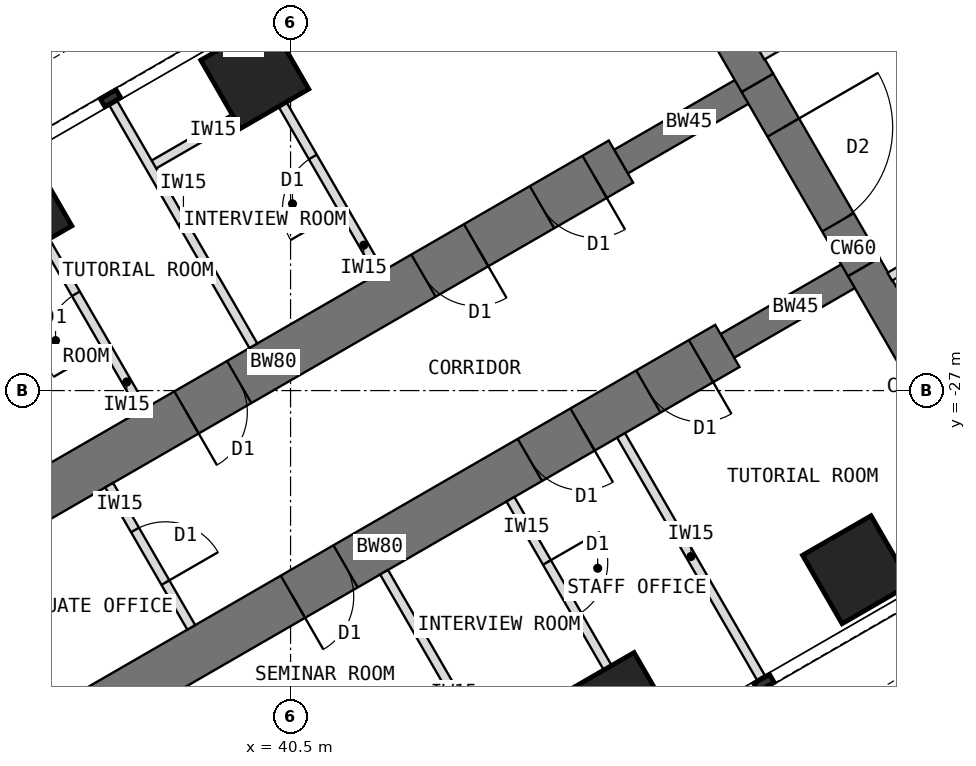
"""IFC4 building model, lengths in metres.
Left out: names, types, materials, properties, quantities, classifications, styles, units other than length and angle.
Written with IfcOpenShell. Run it as: python <this file> out.ifc"""

import sys

from ifc_helpers import new_model, si_unit, direction, frame, frame_2d, origin, origin_2d, place, context, subcontext, project, spatial, rectangle, extrude, element, fill, save


model = new_model("IFC4")
c1 = context("Model", 3, precision=1e-05, world=origin(), true_north=direction((0.0, 1.0)))
c2 = subcontext(c1, "Body", "Model", "MODEL_VIEW")
j1 = project(units=[si_unit("LENGTHUNIT", "METRE"), si_unit("PLANEANGLEUNIT", "RADIAN")], contexts=[c1])
p1 = place(None, origin())
s1 = spatial("IfcSite", under=j1, at=p1, CompositionType="ELEMENT")
p2 = place(p1, origin())
s2 = spatial("IfcBuilding", under=s1, at=p2, CompositionType="ELEMENT")
p3 = place(p2, frame((0.0, 0.0, 133.5)))
s3 = spatial("IfcBuildingStorey", under=s2, at=p3, CompositionType="ELEMENT", Elevation=133.5)
p4 = place(p3, frame((45.904, -18.0, 0.0), z_axis=(0.0, 0.0, 1.0), x_axis=(0.500024481964, -0.866011268655, 0.0)))
e1 = element("IfcWall", 1, at=p4, inside=s3, PredefinedType="SHEAR", context=c2, shape_type="SweptSolid", body=[
    extrude(rectangle(XDim=4.548, YDim=0.6, at=frame_2d((2.274, 0.0))), origin(), (0.0, 0.0, 1.0), 4.0),
])
p5 = place(p3, frame((48.178, -21.939, 0.0), z_axis=(0.0, 0.0, 1.0), x_axis=(0.500010275428, -0.866019471182, 0.0)))
e2 = element("IfcWall", 2, at=p5, inside=s3, PredefinedType="SHEAR", context=c2, shape_type="SweptSolid", body=[
    extrude(rectangle(XDim=3.5, YDim=0.6, at=frame_2d((1.75, 0.0))), origin(), (0.0, 0.0, 1.0), 4.0),
])
p6 = place(p5, frame((0.85, 0.0, 0.0)))
e3 = element("IfcOpeningElement", 3, at=p6, cuts=e2, PredefinedType="OPENING", context=c2, shape_type="SweptSolid", body=[
    extrude(rectangle(XDim=1.8, YDim=2.1, at=frame_2d((0.9, 1.05))), frame((0.0, 0.31, 0.0), z_axis=(0.0, -1.0, 0.0), x_axis=(1.0, 0.0, 0.0)), (0.0, 0.0, 1.0), 0.62),
])
p7 = place(p3, frame((49.928, -24.97, 0.0), z_axis=(0.0, 0.0, 1.0), x_axis=(0.499984222037, -0.866034513004, 0.0)))
e4 = element("IfcWall", 4, at=p7, inside=s3, PredefinedType="SHEAR", context=c2, shape_type="SweptSolid", body=[
    extrude(rectangle(XDim=4.548, YDim=0.6, at=frame_2d((2.274, 0.0))), origin(), (0.0, 0.0, 1.0), 4.0),
])
p8 = place(p3, frame((49.928, -24.97, 0.0), z_axis=(0.0, 0.0, 1.0), x_axis=(-0.866031863473, -0.499988811324, 0.0)))
e5 = element("IfcWall", 5, at=p8, inside=s3, PredefinedType="SHEAR", context=c2, shape_type="SweptSolid", body=[
    extrude(rectangle(XDim=2.592, YDim=0.45, at=frame_2d((1.296, 0.0))), origin(), (0.0, 0.0, 1.0), 4.0),
])
p9 = place(p3, frame((47.684, -26.266, 0.0), z_axis=(0.0, 0.0, 1.0), x_axis=(-0.866027579429, -0.499996231654, 0.0)))
e6 = element("IfcWall", 6, at=p9, inside=s3, PredefinedType="SHEAR", context=c2, shape_type="SweptSolid", body=[
    extrude(rectangle(XDim=13.2, YDim=0.8, at=frame_2d((6.6, 0.0))), origin(), (0.0, 0.0, 1.0), 4.0),
])
p10 = place(p9, frame((0.5, 0.0, 0.0)))
e7 = element("IfcOpeningElement", 7, at=p10, cuts=e6, PredefinedType="OPENING", context=c2, shape_type="SweptSolid", body=[
    extrude(rectangle(XDim=1.0, YDim=2.1, at=frame_2d((0.5, 1.05))), frame((0.0, 0.41, 0.0), z_axis=(0.0, -1.0, 0.0), x_axis=(1.0, 0.0, 0.0)), (0.0, 0.0, 1.0), 0.82),
])
p11 = place(p9, frame((2.75, 0.0, 0.0)))
e8 = element("IfcOpeningElement", 8, at=p11, cuts=e6, PredefinedType="OPENING", context=c2, shape_type="SweptSolid", body=[
    extrude(rectangle(XDim=1.0, YDim=2.1, at=frame_2d((0.5, 1.05))), frame((0.0, 0.41, 0.0), z_axis=(0.0, -1.0, 0.0), x_axis=(1.0, 0.0, 0.0)), (0.0, 0.0, 1.0), 0.82),
])
p12 = place(p9, frame((7.25, 0.0, 0.0)))
e9 = element("IfcOpeningElement", 9, at=p12, cuts=e6, PredefinedType="OPENING", context=c2, shape_type="SweptSolid", body=[
    extrude(rectangle(XDim=1.0, YDim=2.1, at=frame_2d((0.5, 1.05))), frame((0.0, 0.41, 0.0), z_axis=(0.0, -1.0, 0.0), x_axis=(1.0, 0.0, 0.0)), (0.0, 0.0, 1.0), 0.82),
])
p13 = place(p3, frame((48.178, -21.939, 0.0), z_axis=(0.0, 0.0, 1.0), x_axis=(-0.866072649678, -0.499918158782, 0.0)))
e10 = element("IfcWall", 10, at=p13, inside=s3, PredefinedType="SHEAR", context=c2, shape_type="SweptSolid", body=[
    extrude(rectangle(XDim=2.592, YDim=0.45, at=frame_2d((1.296, 0.0))), origin(), (0.0, 0.0, 1.0), 4.0),
])
p14 = place(p3, frame((45.934, -23.234, 0.0), z_axis=(0.0, 0.0, 1.0), x_axis=(-0.866019570528, -0.500010103361, 0.0)))
e11 = element("IfcWall", 11, at=p14, inside=s3, PredefinedType="SHEAR", context=c2, shape_type="SweptSolid", body=[
    extrude(rectangle(XDim=13.2, YDim=0.8, at=frame_2d((6.6, 0.0))), origin(), (0.0, 0.0, 1.0), 4.0),
])
p15 = place(p14, frame((0.5, 0.0, 0.0)))
e12 = element("IfcOpeningElement", 12, at=p15, cuts=e11, PredefinedType="OPENING", context=c2, shape_type="SweptSolid", body=[
    extrude(rectangle(XDim=1.0, YDim=2.1, at=frame_2d((0.5, 1.05))), frame((0.0, 0.41, 0.0), z_axis=(0.0, -1.0, 0.0), x_axis=(1.0, 0.0, 0.0)), (0.0, 0.0, 1.0), 0.82),
])
p16 = place(p14, frame((2.75, 0.0, 0.0)))
e13 = element("IfcOpeningElement", 13, at=p16, cuts=e11, PredefinedType="OPENING", context=c2, shape_type="SweptSolid", body=[
    extrude(rectangle(XDim=1.0, YDim=2.1, at=frame_2d((0.5, 1.05))), frame((0.0, 0.41, 0.0), z_axis=(0.0, -1.0, 0.0), x_axis=(1.0, 0.0, 0.0)), (0.0, 0.0, 1.0), 0.82),
])
p17 = place(p14, frame((7.25, 0.0, 0.0)))
e14 = element("IfcOpeningElement", 14, at=p17, cuts=e11, PredefinedType="OPENING", context=c2, shape_type="SweptSolid", body=[
    extrude(rectangle(XDim=1.0, YDim=2.1, at=frame_2d((0.5, 1.05))), frame((0.0, 0.41, 0.0), z_axis=(0.0, -1.0, 0.0), x_axis=(1.0, 0.0, 0.0)), (0.0, 0.0, 1.0), 0.82),
])
for number, where, z_axis, x_axis in (
    (15, (49.809, -29.946, 0.0), (0.0, 0.0, 1.0), (0.866, 0.5, 0.0)),
    (16, (45.912, -32.196, 0.0), (0.0, 0.0, 1.0), (0.866, 0.5, 0.0)),
    (17, (39.912, -21.804, 0.0), (0.0, 0.0, 1.0), (0.866, 0.5, 0.0)),
    (18, (36.014, -24.054, 0.0), (0.0, 0.0, 1.0), (0.866, 0.5, 0.0)),
):
    element("IfcColumn", number, at=place(p3, frame(where, z_axis=z_axis, x_axis=x_axis)), inside=s3, PredefinedType="COLUMN", context=c2, shape_type="SweptSolid", body=[
        extrude(rectangle(XDim=1.3, YDim=1.3, at=origin_2d()), origin(), (0.0, 0.0, 1.0), 4.0),
    ])
for number, where, z_axis, x_axis in (
    (19, (45.935, -27.737, 0.0), (0.0, 0.0, 1.0), (0.5, -0.866, 0.0)),
    (20, (42.038, -29.987, 0.0), (0.0, 0.0, 1.0), (0.5, -0.866, 0.0)),
):
    element("IfcWall", number, at=place(p3, frame(where, z_axis=z_axis, x_axis=x_axis)), inside=s3, PredefinedType="PARTITIONING", context=c2, shape_type="SweptSolid", body=[
        extrude(rectangle(XDim=4.6, YDim=0.15, at=frame_2d((2.3, 0.0))), origin(), (0.0, 0.0, 1.0), 3.8),
    ])
p18 = place(p3, frame((45.816, -31.731, 0.0), z_axis=(0.0, 0.0, 1.0), x_axis=(-0.866024647952, -0.500001309137, 0.0)))
e21 = element("IfcWall", 21, at=p18, inside=s3, PredefinedType="PARTITIONING", context=c2, shape_type="SweptSolid", body=[
    extrude(rectangle(XDim=2.4, YDim=0.15, at=frame_2d((1.2, 0.0))), origin(), (0.0, 0.0, 1.0), 3.8),
])
p19 = place(p3, frame((44.116, -28.787, 0.0), z_axis=(0.0, 0.0, 1.0), x_axis=(0.499977295307, -0.866038511948, 0.0)))
e22 = element("IfcWall", 22, at=p19, inside=s3, PredefinedType="PARTITIONING", context=c2, shape_type="SweptSolid", body=[
    extrude(rectangle(XDim=3.4, YDim=0.15, at=frame_2d((1.7, 0.0))), origin(), (0.0, 0.0, 1.0), 3.8),
])
p20 = place(p19, frame((1.2, 0.0, 0.0)))
e23 = element("IfcOpeningElement", 23, at=p20, cuts=e22, PredefinedType="OPENING", context=c2, shape_type="SweptSolid", body=[
    extrude(rectangle(XDim=1.0, YDim=2.1, at=frame_2d((0.5, 1.05))), frame((0.0, 0.085, 0.0), z_axis=(0.0, -1.0, 0.0), x_axis=(1.0, 0.0, 0.0)), (0.0, 0.0, 1.0), 0.17),
])
p21 = place(p3, frame((39.888, -26.263, 0.0), z_axis=(0.0, 0.0, 1.0), x_axis=(-0.500014953309, 0.866016770315, 0.0)))
e24 = element("IfcWall", 24, at=p21, inside=s3, PredefinedType="PARTITIONING", context=c2, shape_type="SweptSolid", body=[
    extrude(rectangle(XDim=4.6, YDim=0.15, at=frame_2d((2.3, 0.0))), origin(), (0.0, 0.0, 1.0), 3.8),
])
p22 = place(p3, frame((40.266, -22.119, 0.0), z_axis=(0.0, 0.0, 1.0), x_axis=(-0.866024647952, -0.500001309137, 0.0)))
e25 = element("IfcWall", 25, at=p22, inside=s3, PredefinedType="PARTITIONING", context=c2, shape_type="SweptSolid", body=[
    extrude(rectangle(XDim=2.4, YDim=0.15, at=frame_2d((1.2, 0.0))), origin(), (0.0, 0.0, 1.0), 3.8),
])
p23 = place(p3, frame((41.967, -25.063, 0.0), z_axis=(0.0, 0.0, 1.0), x_axis=(-0.500062241894, 0.865989465428, 0.0)))
e26 = element("IfcWall", 26, at=p23, inside=s3, PredefinedType="PARTITIONING", context=c2, shape_type="SweptSolid", body=[
    extrude(rectangle(XDim=3.4, YDim=0.15, at=frame_2d((1.7, 0.0))), origin(), (0.0, 0.0, 1.0), 3.8),
])
p24 = place(p23, frame((1.2, 0.0, 0.0)))
e27 = element("IfcOpeningElement", 27, at=p24, cuts=e26, PredefinedType="OPENING", context=c2, shape_type="SweptSolid", body=[
    extrude(rectangle(XDim=1.0, YDim=2.1, at=frame_2d((0.5, 1.05))), frame((0.0, 0.085, 0.0), z_axis=(0.0, -1.0, 0.0), x_axis=(1.0, 0.0, 0.0)), (0.0, 0.0, 1.0), 0.17),
])
p25 = place(p3, frame((38.069, -27.313, 0.0), z_axis=(0.0, 0.0, 1.0), x_axis=(-0.500008388397, 0.866020560687, 0.0)))
e28 = element("IfcWall", 28, at=p25, inside=s3, PredefinedType="PARTITIONING", context=c2, shape_type="SweptSolid", body=[
    extrude(rectangle(XDim=3.4, YDim=0.15, at=frame_2d((1.7, 0.0))), origin(), (0.0, 0.0, 1.0), 3.8),
])
p26 = place(p25, frame((1.2, 0.0, 0.0)))
e29 = element("IfcOpeningElement", 29, at=p26, cuts=e28, PredefinedType="OPENING", context=c2, shape_type="SweptSolid", body=[
    extrude(rectangle(XDim=1.0, YDim=2.1, at=frame_2d((0.5, 1.05))), frame((0.0, 0.085, 0.0), z_axis=(0.0, -1.0, 0.0), x_axis=(1.0, 0.0, 0.0)), (0.0, 0.0, 1.0), 0.17),
])
p27 = place(p3, frame((48.254, -21.49, 0.0), z_axis=(0.0, 0.0, 1.0), x_axis=(0.866025707867, 0.499999473313, 0.0)))
e30 = element("IfcWall", 30, at=p27, inside=s3, PredefinedType="PARTITIONING", context=c2, shape_type="SweptSolid", body=[
    extrude(rectangle(XDim=4.476, YDim=0.15, at=frame_2d((2.238, 0.0))), origin(), (0.0, 0.0, 1.0), 3.8),
])
p28 = place(p27, frame((2.633, 0.0, 0.0)))
e31 = element("IfcOpeningElement", 31, at=p28, cuts=e30, PredefinedType="OPENING", context=c2, shape_type="SweptSolid", body=[
    extrude(rectangle(XDim=1.0, YDim=2.1, at=frame_2d((0.5, 1.05))), frame((0.0, 0.085, 0.0), z_axis=(0.0, -1.0, 0.0), x_axis=(1.0, 0.0, 0.0)), (0.0, 0.0, 1.0), 0.17),
])
p29 = place(p3, frame((54.23, -22.89, 0.0), z_axis=(0.0, 0.0, 1.0), x_axis=(-0.866025707867, -0.499999473313, 0.0)))
e32 = element("IfcWall", 32, at=p29, inside=s3, PredefinedType="PARTITIONING", context=c2, shape_type="SweptSolid", body=[
    extrude(rectangle(XDim=4.476, YDim=0.15, at=frame_2d((2.238, 0.0))), origin(), (0.0, 0.0, 1.0), 3.8),
])
p30 = place(p29, frame((0.843, 0.0, 0.0)))
e33 = element("IfcOpeningElement", 33, at=p30, cuts=e32, PredefinedType="OPENING", context=c2, shape_type="SweptSolid", body=[
    extrude(rectangle(XDim=1.0, YDim=2.1, at=frame_2d((0.5, 1.05))), frame((0.0, 0.085, 0.0), z_axis=(0.0, -1.0, 0.0), x_axis=(1.0, 0.0, 0.0)), (0.0, 0.0, 1.0), 0.17),
])
p31 = place(p3, frame((37.517, -28.556, 0.0), z_axis=(0.0, 0.0, 1.0), x_axis=(0.500048589285, -0.86599734893, 0.0)))
e34 = element("IfcWall", 34, at=p31, inside=s3, PredefinedType="PARTITIONING", context=c2, shape_type="SweptSolid", body=[
    extrude(rectangle(XDim=2.7, YDim=0.15, at=frame_2d((1.35, 0.0))), origin(), (0.0, 0.0, 1.0), 3.8),
])
p32 = place(p31, frame((0.85, 0.0, 0.0)))
e35 = element("IfcOpeningElement", 35, at=p32, cuts=e34, PredefinedType="OPENING", context=c2, shape_type="SweptSolid", body=[
    extrude(rectangle(XDim=1.0, YDim=2.1, at=frame_2d((0.5, 1.05))), frame((0.0, 0.085, 0.0), z_axis=(0.0, -1.0, 0.0), x_axis=(1.0, 0.0, 0.0)), (0.0, 0.0, 1.0), 0.17),
])
p33 = place(p6, origin())
e36 = element("IfcDoor", 36, at=p33, inside=s3, OperationType="DOUBLE_DOOR_DOUBLE_SWING", PredefinedType="DOOR", context=c2, shape_type="SweptSolid", body=[
    extrude(rectangle(XDim=1.72, YDim=2.06, at=frame_2d((0.9, 1.03))), frame((0.0, 0.025, 0.0), z_axis=(0.0, -1.0, 0.0), x_axis=(1.0, 0.0, 0.0)), (0.0, 0.0, 1.0), 0.05),
    extrude(rectangle(XDim=0.04, YDim=2.1, at=frame_2d((0.02, 1.05))), frame((0.0, 0.3, 0.0), z_axis=(0.0, -1.0, 0.0), x_axis=(1.0, 0.0, 0.0)), (0.0, 0.0, 1.0), 0.6),
    extrude(rectangle(XDim=0.04, YDim=2.1, at=frame_2d((1.78, 1.05))), frame((0.0, 0.3, 0.0), z_axis=(0.0, -1.0, 0.0), x_axis=(1.0, 0.0, 0.0)), (0.0, 0.0, 1.0), 0.6),
    extrude(rectangle(XDim=1.72, YDim=0.04, at=frame_2d((0.9, 2.08))), frame((0.0, 0.3, 0.0), z_axis=(0.0, -1.0, 0.0), x_axis=(1.0, 0.0, 0.0)), (0.0, 0.0, 1.0), 0.6),
])
fill(e3, e36)
p34 = place(p20, origin())
e37 = element("IfcDoor", 37, at=p34, inside=s3, OperationType="SINGLE_SWING_LEFT", PredefinedType="DOOR", context=c2, shape_type="SweptSolid", body=[
    extrude(rectangle(XDim=1.0, YDim=2.1, at=frame_2d((0.5, 1.05))), frame((0.0, 0.025, 0.0), z_axis=(0.0, -1.0, 0.0), x_axis=(1.0, 0.0, 0.0)), (0.0, 0.0, 1.0), 0.05),
])
fill(e23, e37)
p35 = place(p24, origin())
e38 = element("IfcDoor", 38, at=p35, inside=s3, OperationType="SINGLE_SWING_LEFT", PredefinedType="DOOR", context=c2, shape_type="SweptSolid", body=[
    extrude(rectangle(XDim=1.0, YDim=2.1, at=frame_2d((0.5, 1.05))), frame((0.0, 0.025, 0.0), z_axis=(0.0, -1.0, 0.0), x_axis=(1.0, 0.0, 0.0)), (0.0, 0.0, 1.0), 0.05),
])
fill(e27, e38)
p36 = place(p26, origin())
e39 = element("IfcDoor", 39, at=p36, inside=s3, OperationType="SINGLE_SWING_LEFT", PredefinedType="DOOR", context=c2, shape_type="SweptSolid", body=[
    extrude(rectangle(XDim=1.0, YDim=2.1, at=frame_2d((0.5, 1.05))), frame((0.0, 0.025, 0.0), z_axis=(0.0, -1.0, 0.0), x_axis=(1.0, 0.0, 0.0)), (0.0, 0.0, 1.0), 0.05),
])
fill(e29, e39)
p37 = place(p32, origin())
e40 = element("IfcDoor", 40, at=p37, inside=s3, OperationType="SINGLE_SWING_RIGHT", PredefinedType="DOOR", context=c2, shape_type="SweptSolid", body=[
    extrude(rectangle(XDim=1.0, YDim=2.1, at=frame_2d((0.5, 1.05))), frame((0.0, 0.025, 0.0), z_axis=(0.0, -1.0, 0.0), x_axis=(1.0, 0.0, 0.0)), (0.0, 0.0, 1.0), 0.05),
])
fill(e35, e40)
p38 = place(p10, origin())
e41 = element("IfcDoor", 41, at=p38, inside=s3, OperationType="SINGLE_SWING_LEFT", PredefinedType="DOOR", context=c2, shape_type="SweptSolid", body=[
    extrude(rectangle(XDim=0.92, YDim=2.06, at=frame_2d((0.5, 1.03))), frame((0.0, 0.025, 0.0), z_axis=(0.0, -1.0, 0.0), x_axis=(1.0, 0.0, 0.0)), (0.0, 0.0, 1.0), 0.05),
    extrude(rectangle(XDim=0.04, YDim=2.1, at=frame_2d((0.02, 1.05))), frame((0.0, 0.4, 0.0), z_axis=(0.0, -1.0, 0.0), x_axis=(1.0, 0.0, 0.0)), (0.0, 0.0, 1.0), 0.8),
    extrude(rectangle(XDim=0.04, YDim=2.1, at=frame_2d((0.98, 1.05))), frame((0.0, 0.4, 0.0), z_axis=(0.0, -1.0, 0.0), x_axis=(1.0, 0.0, 0.0)), (0.0, 0.0, 1.0), 0.8),
    extrude(rectangle(XDim=0.92, YDim=0.04, at=frame_2d((0.5, 2.08))), frame((0.0, 0.4, 0.0), z_axis=(0.0, -1.0, 0.0), x_axis=(1.0, 0.0, 0.0)), (0.0, 0.0, 1.0), 0.8),
])
fill(e7, e41)
p39 = place(p11, origin())
e42 = element("IfcDoor", 42, at=p39, inside=s3, OperationType="SINGLE_SWING_LEFT", PredefinedType="DOOR", context=c2, shape_type="SweptSolid", body=[
    extrude(rectangle(XDim=0.92, YDim=2.06, at=frame_2d((0.5, 1.03))), frame((0.0, 0.025, 0.0), z_axis=(0.0, -1.0, 0.0), x_axis=(1.0, 0.0, 0.0)), (0.0, 0.0, 1.0), 0.05),
    extrude(rectangle(XDim=0.04, YDim=2.1, at=frame_2d((0.02, 1.05))), frame((0.0, 0.4, 0.0), z_axis=(0.0, -1.0, 0.0), x_axis=(1.0, 0.0, 0.0)), (0.0, 0.0, 1.0), 0.8),
    extrude(rectangle(XDim=0.04, YDim=2.1, at=frame_2d((0.98, 1.05))), frame((0.0, 0.4, 0.0), z_axis=(0.0, -1.0, 0.0), x_axis=(1.0, 0.0, 0.0)), (0.0, 0.0, 1.0), 0.8),
    extrude(rectangle(XDim=0.92, YDim=0.04, at=frame_2d((0.5, 2.08))), frame((0.0, 0.4, 0.0), z_axis=(0.0, -1.0, 0.0), x_axis=(1.0, 0.0, 0.0)), (0.0, 0.0, 1.0), 0.8),
])
fill(e8, e42)
p40 = place(p12, origin())
e43 = element("IfcDoor", 43, at=p40, inside=s3, OperationType="SINGLE_SWING_RIGHT", PredefinedType="DOOR", context=c2, shape_type="SweptSolid", body=[
    extrude(rectangle(XDim=0.92, YDim=2.06, at=frame_2d((0.5, 1.03))), frame((0.0, 0.025, 0.0), z_axis=(0.0, -1.0, 0.0), x_axis=(1.0, 0.0, 0.0)), (0.0, 0.0, 1.0), 0.05),
    extrude(rectangle(XDim=0.04, YDim=2.1, at=frame_2d((0.02, 1.05))), frame((0.0, 0.4, 0.0), z_axis=(0.0, -1.0, 0.0), x_axis=(1.0, 0.0, 0.0)), (0.0, 0.0, 1.0), 0.8),
    extrude(rectangle(XDim=0.04, YDim=2.1, at=frame_2d((0.98, 1.05))), frame((0.0, 0.4, 0.0), z_axis=(0.0, -1.0, 0.0), x_axis=(1.0, 0.0, 0.0)), (0.0, 0.0, 1.0), 0.8),
    extrude(rectangle(XDim=0.92, YDim=0.04, at=frame_2d((0.5, 2.08))), frame((0.0, 0.4, 0.0), z_axis=(0.0, -1.0, 0.0), x_axis=(1.0, 0.0, 0.0)), (0.0, 0.0, 1.0), 0.8),
])
fill(e9, e43)
p41 = place(p15, origin())
e44 = element("IfcDoor", 44, at=p41, inside=s3, OperationType="SINGLE_SWING_LEFT", PredefinedType="DOOR", context=c2, shape_type="SweptSolid", body=[
    extrude(rectangle(XDim=0.92, YDim=2.06, at=frame_2d((0.5, 1.03))), frame((0.0, 0.025, 0.0), z_axis=(0.0, -1.0, 0.0), x_axis=(1.0, 0.0, 0.0)), (0.0, 0.0, 1.0), 0.05),
    extrude(rectangle(XDim=0.04, YDim=2.1, at=frame_2d((0.02, 1.05))), frame((0.0, 0.4, 0.0), z_axis=(0.0, -1.0, 0.0), x_axis=(1.0, 0.0, 0.0)), (0.0, 0.0, 1.0), 0.8),
    extrude(rectangle(XDim=0.04, YDim=2.1, at=frame_2d((0.98, 1.05))), frame((0.0, 0.4, 0.0), z_axis=(0.0, -1.0, 0.0), x_axis=(1.0, 0.0, 0.0)), (0.0, 0.0, 1.0), 0.8),
    extrude(rectangle(XDim=0.92, YDim=0.04, at=frame_2d((0.5, 2.08))), frame((0.0, 0.4, 0.0), z_axis=(0.0, -1.0, 0.0), x_axis=(1.0, 0.0, 0.0)), (0.0, 0.0, 1.0), 0.8),
])
fill(e12, e44)
p42 = place(p16, origin())
e45 = element("IfcDoor", 45, at=p42, inside=s3, OperationType="SINGLE_SWING_LEFT", PredefinedType="DOOR", context=c2, shape_type="SweptSolid", body=[
    extrude(rectangle(XDim=0.92, YDim=2.06, at=frame_2d((0.5, 1.03))), frame((0.0, 0.025, 0.0), z_axis=(0.0, -1.0, 0.0), x_axis=(1.0, 0.0, 0.0)), (0.0, 0.0, 1.0), 0.05),
    extrude(rectangle(XDim=0.04, YDim=2.1, at=frame_2d((0.02, 1.05))), frame((0.0, 0.4, 0.0), z_axis=(0.0, -1.0, 0.0), x_axis=(1.0, 0.0, 0.0)), (0.0, 0.0, 1.0), 0.8),
    extrude(rectangle(XDim=0.04, YDim=2.1, at=frame_2d((0.98, 1.05))), frame((0.0, 0.4, 0.0), z_axis=(0.0, -1.0, 0.0), x_axis=(1.0, 0.0, 0.0)), (0.0, 0.0, 1.0), 0.8),
    extrude(rectangle(XDim=0.92, YDim=0.04, at=frame_2d((0.5, 2.08))), frame((0.0, 0.4, 0.0), z_axis=(0.0, -1.0, 0.0), x_axis=(1.0, 0.0, 0.0)), (0.0, 0.0, 1.0), 0.8),
])
fill(e13, e45)
p43 = place(p17, origin())
e46 = element("IfcDoor", 46, at=p43, inside=s3, OperationType="SINGLE_SWING_RIGHT", PredefinedType="DOOR", context=c2, shape_type="SweptSolid", body=[
    extrude(rectangle(XDim=0.92, YDim=2.06, at=frame_2d((0.5, 1.03))), frame((0.0, 0.025, 0.0), z_axis=(0.0, -1.0, 0.0), x_axis=(1.0, 0.0, 0.0)), (0.0, 0.0, 1.0), 0.05),
    extrude(rectangle(XDim=0.04, YDim=2.1, at=frame_2d((0.02, 1.05))), frame((0.0, 0.4, 0.0), z_axis=(0.0, -1.0, 0.0), x_axis=(1.0, 0.0, 0.0)), (0.0, 0.0, 1.0), 0.8),
    extrude(rectangle(XDim=0.04, YDim=2.1, at=frame_2d((0.98, 1.05))), frame((0.0, 0.4, 0.0), z_axis=(0.0, -1.0, 0.0), x_axis=(1.0, 0.0, 0.0)), (0.0, 0.0, 1.0), 0.8),
    extrude(rectangle(XDim=0.92, YDim=0.04, at=frame_2d((0.5, 2.08))), frame((0.0, 0.4, 0.0), z_axis=(0.0, -1.0, 0.0), x_axis=(1.0, 0.0, 0.0)), (0.0, 0.0, 1.0), 0.8),
])
fill(e14, e46)
save(model, sys.argv[1])
